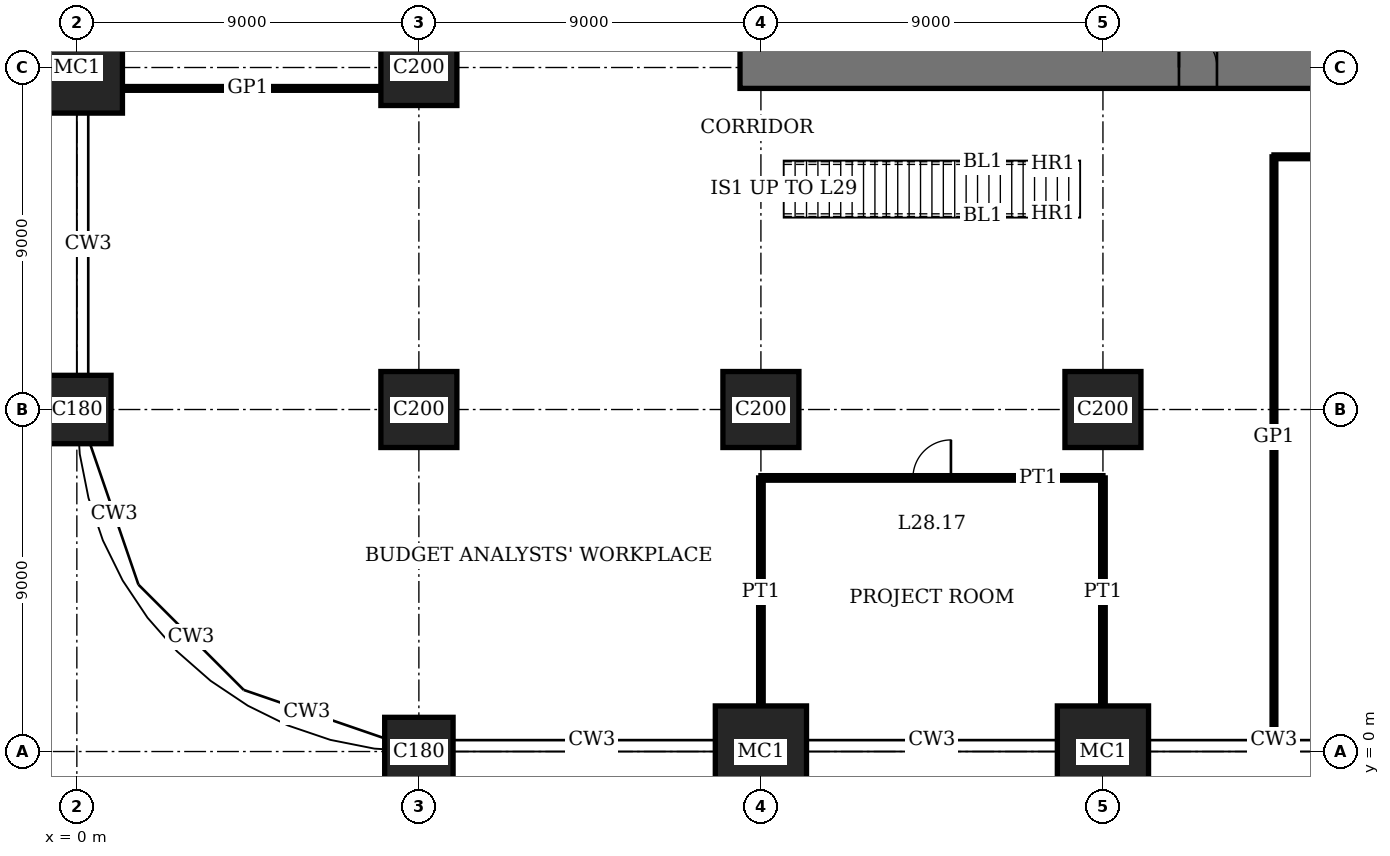
"""IFC4 building model, lengths in metres.
Left out: names, types, materials, properties, quantities, classifications, styles, units other than length and angle.
Written with IfcOpenShell. Run it as: python <this file> out.ifc"""

import sys

from ifc_helpers import new_model, si_unit, direction, frame, frame_2d, origin, origin_2d, place, context, subcontext, project, spatial, rectangle, extrude, element, fill, save


model = new_model("IFC4")
c1 = context("Model", 3, precision=1e-05, world=origin(), true_north=direction((0.0, 1.0)))
c2 = subcontext(c1, "Body", "Model", "MODEL_VIEW")
j1 = project(units=[si_unit("LENGTHUNIT", "METRE"), si_unit("PLANEANGLEUNIT", "RADIAN")], contexts=[c1])
p1 = place(None, origin())
s1 = spatial("IfcSite", under=j1, at=p1, CompositionType="ELEMENT")
p2 = place(p1, origin())
s2 = spatial("IfcBuilding", under=s1, at=p2, CompositionType="ELEMENT")
p3 = place(p2, frame((0.0, 0.0, 117.0)))
s3 = spatial("IfcBuildingStorey", under=s2, at=p3, CompositionType="ELEMENT", Elevation=117.0)
p4 = place(p3, frame((0.0, 9.0, 0.0), z_axis=(0.0, 0.0, 1.0), x_axis=(1.0, 0.0, 0.0)))
e1 = element("IfcColumn", 1, at=p4, inside=s3, PredefinedType="COLUMN", context=c2, shape_type="SweptSolid", body=[
    extrude(rectangle(XDim=1.8, YDim=1.8, at=origin_2d()), origin(), (0.0, 0.0, 1.0), 4.0),
])
p5 = place(p3, frame((0.0, 18.0, 0.0), z_axis=(0.0, 0.0, 1.0), x_axis=(1.0, 0.0, 0.0)))
e2 = element("IfcColumn", 2, at=p5, inside=s3, PredefinedType="COLUMN", context=c2, shape_type="SweptSolid", body=[
    extrude(rectangle(XDim=2.4, YDim=2.4, at=origin_2d()), origin(), (0.0, 0.0, 1.0), 4.0),
])
p6 = place(p3, frame((9.0, 0.0, 0.0), z_axis=(0.0, 0.0, 1.0), x_axis=(1.0, 0.0, 0.0)))
e3 = element("IfcColumn", 3, at=p6, inside=s3, PredefinedType="COLUMN", context=c2, shape_type="SweptSolid", body=[
    extrude(rectangle(XDim=1.8, YDim=1.8, at=origin_2d()), origin(), (0.0, 0.0, 1.0), 4.0),
])
for number, where, z_axis, x_axis in (
    (4, (9.0, 9.0, 0.0), (0.0, 0.0, 1.0), (1.0, 0.0, 0.0)),
    (5, (9.0, 18.0, 0.0), (0.0, 0.0, 1.0), (1.0, 0.0, 0.0)),
):
    element("IfcColumn", number, at=place(p3, frame(where, z_axis=z_axis, x_axis=x_axis)), inside=s3, PredefinedType="COLUMN", context=c2, shape_type="SweptSolid", body=[
        extrude(rectangle(XDim=2.0, YDim=2.0, at=origin_2d()), origin(), (0.0, 0.0, 1.0), 4.0),
    ])
p7 = place(p3, frame((18.0, 0.0, 0.0), z_axis=(0.0, 0.0, 1.0), x_axis=(1.0, 0.0, 0.0)))
e6 = element("IfcColumn", 6, at=p7, inside=s3, PredefinedType="COLUMN", context=c2, shape_type="SweptSolid", body=[
    extrude(rectangle(XDim=2.4, YDim=2.4, at=origin_2d()), origin(), (0.0, 0.0, 1.0), 4.0),
])
p8 = place(p3, frame((18.0, 9.0, 0.0), z_axis=(0.0, 0.0, 1.0), x_axis=(1.0, 0.0, 0.0)))
e7 = element("IfcColumn", 7, at=p8, inside=s3, PredefinedType="COLUMN", context=c2, shape_type="SweptSolid", body=[
    extrude(rectangle(XDim=2.0, YDim=2.0, at=origin_2d()), origin(), (0.0, 0.0, 1.0), 4.0),
])
p9 = place(p3, frame((27.0, 0.0, 0.0), z_axis=(0.0, 0.0, 1.0), x_axis=(1.0, 0.0, 0.0)))
e8 = element("IfcColumn", 8, at=p9, inside=s3, PredefinedType="COLUMN", context=c2, shape_type="SweptSolid", body=[
    extrude(rectangle(XDim=2.4, YDim=2.4, at=origin_2d()), origin(), (0.0, 0.0, 1.0), 4.0),
])
p10 = place(p3, frame((27.0, 9.0, 0.0), z_axis=(0.0, 0.0, 1.0), x_axis=(1.0, 0.0, 0.0)))
e9 = element("IfcColumn", 9, at=p10, inside=s3, PredefinedType="COLUMN", context=c2, shape_type="SweptSolid", body=[
    extrude(rectangle(XDim=2.0, YDim=2.0, at=origin_2d()), origin(), (0.0, 0.0, 1.0), 4.0),
])
p11 = place(p3, frame((17.45, 18.0, 0.0), z_axis=(0.0, 0.0, 1.0), x_axis=(1.0, 0.0, 0.0)))
e10 = element("IfcWall", 10, at=p11, inside=s3, PredefinedType="SHEAR", context=c2, shape_type="SweptSolid", body=[
    extrude(rectangle(XDim=28.1, YDim=1.1, at=frame_2d((14.05, 0.0))), origin(), (0.0, 0.0, 1.0), 4.0),
])
p12 = place(p11, frame((11.55, 0.0, 0.0)))
e11 = element("IfcOpeningElement", 11, at=p12, cuts=e10, PredefinedType="OPENING", context=c2, shape_type="SweptSolid", body=[
    extrude(rectangle(XDim=1.0, YDim=2.4, at=frame_2d((0.5, 1.2))), frame((0.0, 0.56, 0.0), z_axis=(0.0, -1.0, 0.0), x_axis=(1.0, 0.0, 0.0)), (0.0, 0.0, 1.0), 1.12),
])
p13 = place(p11, frame((16.55, 0.0, 0.0)))
e12 = element("IfcOpeningElement", 12, at=p13, cuts=e10, PredefinedType="OPENING", context=c2, shape_type="SweptSolid", body=[
    extrude(rectangle(XDim=1.0, YDim=2.4, at=frame_2d((0.5, 1.2))), frame((0.0, 0.56, 0.0), z_axis=(0.0, -1.0, 0.0), x_axis=(1.0, 0.0, 0.0)), (0.0, 0.0, 1.0), 1.12),
])
p14 = place(p11, frame((20.0, 0.0, 0.0)))
e13 = element("IfcOpeningElement", 13, at=p14, cuts=e10, PredefinedType="OPENING", context=c2, shape_type="SweptSolid", body=[
    extrude(rectangle(XDim=1.1, YDim=2.4, at=frame_2d((0.55, 1.2))), frame((0.0, 0.56, 0.0), z_axis=(0.0, -1.0, 0.0), x_axis=(1.0, 0.0, 0.0)), (0.0, 0.0, 1.0), 1.12),
])
p15 = place(p11, frame((24.05, 0.0, 0.0)))
e14 = element("IfcOpeningElement", 14, at=p15, cuts=e10, PredefinedType="OPENING", context=c2, shape_type="SweptSolid", body=[
    extrude(rectangle(XDim=1.0, YDim=2.4, at=frame_2d((0.5, 1.2))), frame((0.0, 0.56, 0.0), z_axis=(0.0, -1.0, 0.0), x_axis=(1.0, 0.0, 0.0)), (0.0, 0.0, 1.0), 1.12),
])
p16 = place(p3, frame((18.0, 7.2, 0.0), z_axis=(0.0, 0.0, 1.0), x_axis=(1.0, 0.0, 0.0)))
e15 = element("IfcWall", 15, at=p16, inside=s3, PredefinedType="PARTITIONING", context=c2, shape_type="SweptSolid", body=[
    extrude(rectangle(XDim=9.0, YDim=0.12, at=frame_2d((4.5, 0.0))), origin(), (0.0, 0.0, 1.0), 3.75),
])
p17 = place(p16, frame((4.0, 0.0, 0.0)))
e16 = element("IfcOpeningElement", 16, at=p17, cuts=e15, PredefinedType="OPENING", context=c2, shape_type="SweptSolid", body=[
    extrude(rectangle(XDim=1.0, YDim=2.4, at=frame_2d((0.5, 1.2))), frame((0.0, 0.07, 0.0), z_axis=(0.0, -1.0, 0.0), x_axis=(1.0, 0.0, 0.0)), (0.0, 0.0, 1.0), 0.14),
])
p18 = place(p3, frame((31.5, 15.65, 0.0), z_axis=(0.0, 0.0, 1.0), x_axis=(1.0, 0.0, 0.0)))
e17 = element("IfcWall", 17, at=p18, inside=s3, PredefinedType="PARTITIONING", context=c2, shape_type="SweptSolid", body=[
    extrude(rectangle(XDim=15.85, YDim=0.1, at=frame_2d((7.925, 0.0))), origin(), (0.0, 0.0, 1.0), 3.75),
])
p19 = place(p18, frame((7.425, 0.0, 0.0)))
e18 = element("IfcOpeningElement", 18, at=p19, cuts=e17, PredefinedType="OPENING", context=c2, shape_type="SweptSolid", body=[
    extrude(rectangle(XDim=1.0, YDim=2.4, at=frame_2d((0.5, 1.2))), frame((0.0, 0.06, 0.0), z_axis=(0.0, -1.0, 0.0), x_axis=(1.0, 0.0, 0.0)), (0.0, 0.0, 1.0), 0.12),
])
p20 = place(p3, frame((1.2, 17.45, 0.0), z_axis=(0.0, 0.0, 1.0), x_axis=(1.0, 0.0, 0.0)))
e19 = element("IfcWall", 19, at=p20, inside=s3, PredefinedType="PARTITIONING", context=c2, shape_type="SweptSolid", body=[
    extrude(rectangle(XDim=6.8, YDim=0.1, at=frame_2d((3.4, 0.0))), origin(), (0.0, 0.0, 1.0), 3.75),
])
for number, where, z_axis, x_axis in (
    (20, (18.0, 1.2, 0.0), (0.0, 0.0, 1.0), (0.0, 1.0, 0.0)),
    (21, (27.0, 1.2, 0.0), (0.0, 0.0, 1.0), (0.0, 1.0, 0.0)),
):
    element("IfcWall", number, at=place(p3, frame(where, z_axis=z_axis, x_axis=x_axis)), inside=s3, PredefinedType="PARTITIONING", context=c2, shape_type="SweptSolid", body=[
        extrude(rectangle(XDim=6.0, YDim=0.12, at=frame_2d((3.0, 0.0))), origin(), (0.0, 0.0, 1.0), 3.05),
    ])
p21 = place(p3, frame((31.5, 0.31, 0.0), z_axis=(0.0, 0.0, 1.0), x_axis=(0.0, 1.0, 0.0)))
e22 = element("IfcWall", 22, at=p21, inside=s3, PredefinedType="PARTITIONING", context=c2, shape_type="SweptSolid", body=[
    extrude(rectangle(XDim=15.34, YDim=0.1, at=frame_2d((7.67, 0.0))), origin(), (0.0, 0.0, 1.0), 3.75),
])
p22 = place(p12, origin())
e23 = element("IfcDoor", 23, at=p22, inside=s3, OperationType="SINGLE_SWING_RIGHT", PredefinedType="DOOR", context=c2, shape_type="SweptSolid", body=[
    extrude(rectangle(XDim=1.0, YDim=2.4, at=frame_2d((0.5, 1.2))), frame((0.0, 0.025, 0.0), z_axis=(0.0, -1.0, 0.0), x_axis=(1.0, 0.0, 0.0)), (0.0, 0.0, 1.0), 0.05),
    extrude(rectangle(XDim=0.04, YDim=2.4, at=frame_2d((0.02, 1.2))), frame((0.0, 0.4, 0.0), z_axis=(0.0, -1.0, 0.0), x_axis=(1.0, 0.0, 0.0)), (0.0, 0.0, 1.0), 0.8),
    extrude(rectangle(XDim=0.04, YDim=2.4, at=frame_2d((0.98, 1.2))), frame((0.0, 0.4, 0.0), z_axis=(0.0, -1.0, 0.0), x_axis=(1.0, 0.0, 0.0)), (0.0, 0.0, 1.0), 0.8),
    extrude(rectangle(XDim=1.0, YDim=0.04, at=frame_2d((0.5, 2.38))), frame((0.0, 0.4, 0.0), z_axis=(0.0, -1.0, 0.0), x_axis=(1.0, 0.0, 0.0)), (0.0, 0.0, 1.0), 0.8),
])
fill(e11, e23)
p23 = place(p17, origin())
e24 = element("IfcDoor", 24, at=p23, inside=s3, OperationType="SINGLE_SWING_LEFT", PredefinedType="DOOR", context=c2, shape_type="SweptSolid", body=[
    extrude(rectangle(XDim=1.0, YDim=2.4, at=frame_2d((0.5, 1.2))), frame((0.0, 0.025, 0.0), z_axis=(0.0, -1.0, 0.0), x_axis=(1.0, 0.0, 0.0)), (0.0, 0.0, 1.0), 0.05),
])
fill(e16, e24)
save(model, sys.argv[1])
